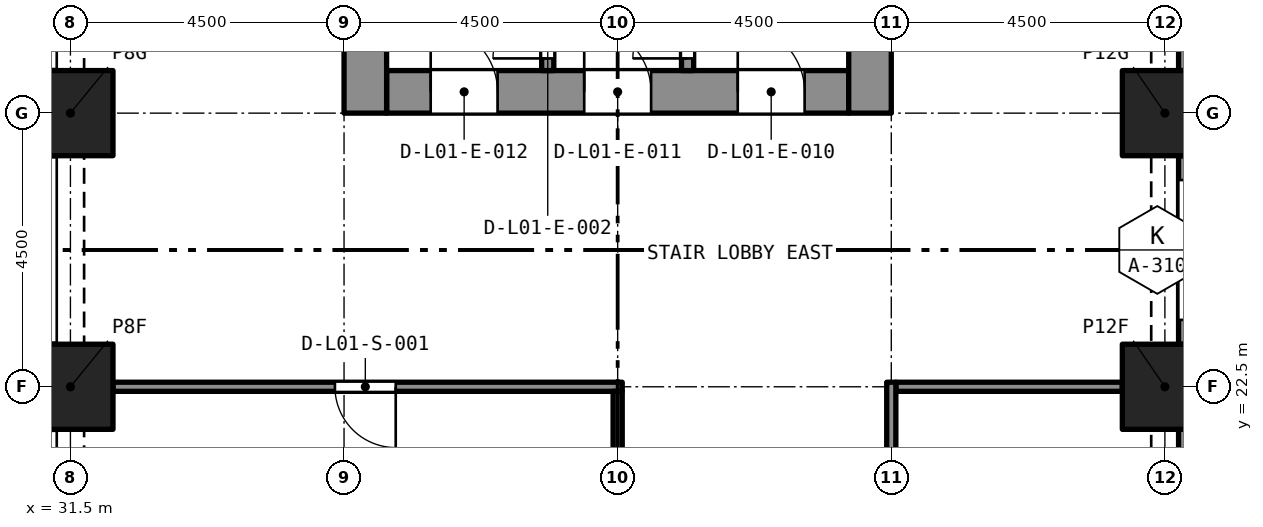
"""IFC4 building model, lengths in metres.
Left out: names, types, materials, properties, quantities, classifications, styles, units other than length and angle.
Written with IfcOpenShell. Run it as: python <this file> out.ifc"""

import sys

from ifc_helpers import new_model, si_unit, direction, frame, frame_2d, origin, origin_2d, place, context, subcontext, project, spatial, rectangle, extrude, element, fill, save


model = new_model("IFC4")
c1 = context("Model", 3, precision=1e-05, world=origin(), true_north=direction((0.0, 1.0)))
c2 = subcontext(c1, "Body", "Model", "MODEL_VIEW")
j1 = project(units=[si_unit("LENGTHUNIT", "METRE"), si_unit("PLANEANGLEUNIT", "RADIAN")], contexts=[c1])
p1 = place(None, origin())
s1 = spatial("IfcSite", under=j1, at=p1, CompositionType="ELEMENT")
p2 = place(p1, origin())
s2 = spatial("IfcBuilding", under=s1, at=p2, CompositionType="ELEMENT")
p3 = place(p2, frame((0.0, 0.0, 6.0)))
s3 = spatial("IfcBuildingStorey", under=s2, at=p3, CompositionType="ELEMENT", Elevation=6.0)
for number, where, z_axis, x_axis in (
    (1, (31.5, 22.5, 0.0), (0.0, 0.0, 1.0), (1.0, 0.0, 0.0)),
    (2, (49.5, 22.5, 0.0), (0.0, 0.0, 1.0), (1.0, 0.0, 0.0)),
    (3, (31.5, 27.0, 0.0), (0.0, 0.0, 1.0), (1.0, 0.0, 0.0)),
    (4, (49.5, 27.0, 0.0), (0.0, 0.0, 1.0), (1.0, 0.0, 0.0)),
):
    element("IfcColumn", number, at=place(p3, frame(where, z_axis=z_axis, x_axis=x_axis)), inside=s3, PredefinedType="COLUMN", context=c2, shape_type="SweptSolid", body=[
        extrude(rectangle(XDim=1.4, YDim=1.4, at=origin_2d()), origin(), (0.0, 0.0, 1.0), 5.0),
    ])
p4 = place(p3, frame((36.7, 27.35, 0.0), z_axis=(0.0, 0.0, 1.0), x_axis=(1.0, 0.0, 0.0)))
e5 = element("IfcWall", 5, at=p4, inside=s3, PredefinedType="SOLIDWALL", context=c2, shape_type="SweptSolid", body=[
    extrude(rectangle(XDim=7.6, YDim=0.7, at=frame_2d((3.8, 0.0))), origin(), (0.0, 0.0, 1.0), 5.0),
])
p5 = place(p4, frame((5.775, 0.0, 0.0)))
e6 = element("IfcOpeningElement", 6, at=p5, cuts=e5, PredefinedType="OPENING", context=c2, shape_type="SweptSolid", body=[
    extrude(rectangle(XDim=1.1, YDim=2.1, at=frame_2d((0.55, 1.05))), frame((0.0, 0.36, 0.0), z_axis=(0.0, -1.0, 0.0), x_axis=(1.0, 0.0, 0.0)), (0.0, 0.0, 1.0), 0.72),
])
p6 = place(p4, frame((3.25, 0.0, 0.0)))
e7 = element("IfcOpeningElement", 7, at=p6, cuts=e5, PredefinedType="OPENING", context=c2, shape_type="SweptSolid", body=[
    extrude(rectangle(XDim=1.1, YDim=2.1, at=frame_2d((0.55, 1.05))), frame((0.0, 0.36, 0.0), z_axis=(0.0, -1.0, 0.0), x_axis=(1.0, 0.0, 0.0)), (0.0, 0.0, 1.0), 0.72),
])
p7 = place(p4, frame((0.725, 0.0, 0.0)))
e8 = element("IfcOpeningElement", 8, at=p7, cuts=e5, PredefinedType="OPENING", context=c2, shape_type="SweptSolid", body=[
    extrude(rectangle(XDim=1.1, YDim=2.1, at=frame_2d((0.55, 1.05))), frame((0.0, 0.36, 0.0), z_axis=(0.0, -1.0, 0.0), x_axis=(1.0, 0.0, 0.0)), (0.0, 0.0, 1.0), 0.72),
])
p8 = place(p3, frame((36.35, 27.0, 0.0), z_axis=(0.0, 0.0, 1.0), x_axis=(0.0, 1.0, 0.0)))
e9 = element("IfcWall", 9, at=p8, inside=s3, PredefinedType="SOLIDWALL", context=c2, shape_type="SweptSolid", body=[
    extrude(rectangle(XDim=13.5, YDim=0.7, at=frame_2d((6.75, 0.0))), origin(), (0.0, 0.0, 1.0), 5.0),
])
p9 = place(p8, frame((8.95, 0.0, 0.0)))
e10 = element("IfcOpeningElement", 10, at=p9, cuts=e9, PredefinedType="OPENING", context=c2, shape_type="SweptSolid", body=[
    extrude(rectangle(XDim=1.2, YDim=2.1, at=frame_2d((0.6, 1.05))), frame((0.0, 0.36, 0.0), z_axis=(0.0, -1.0, 0.0), x_axis=(1.0, 0.0, 0.0)), (0.0, 0.0, 1.0), 0.72),
])
p10 = place(p3, frame((44.65, 27.0, 0.0), z_axis=(0.0, 0.0, 1.0), x_axis=(0.0, 1.0, 0.0)))
e11 = element("IfcWall", 11, at=p10, inside=s3, PredefinedType="SOLIDWALL", context=c2, shape_type="SweptSolid", body=[
    extrude(rectangle(XDim=13.5, YDim=0.7, at=frame_2d((6.75, 0.0))), origin(), (0.0, 0.0, 1.0), 5.0),
])
p11 = place(p10, frame((8.95, 0.0, 0.0)))
e12 = element("IfcOpeningElement", 12, at=p11, cuts=e11, PredefinedType="OPENING", context=c2, shape_type="SweptSolid", body=[
    extrude(rectangle(XDim=1.2, YDim=2.1, at=frame_2d((0.6, 1.05))), frame((0.0, 0.36, 0.0), z_axis=(0.0, -1.0, 0.0), x_axis=(1.0, 0.0, 0.0)), (0.0, 0.0, 1.0), 0.72),
])
p12 = place(p3, frame((49.875, 21.8, 0.0), z_axis=(0.0, 0.0, 1.0), x_axis=(0.0, -1.0, 0.0)))
e13 = element("IfcWall", 13, at=p12, inside=s3, PredefinedType="SOLIDWALL", context=c2, shape_type="SweptSolid", body=[
    extrude(rectangle(XDim=3.1, YDim=0.3, at=frame_2d((1.55, 0.0))), origin(), (0.0, 0.0, 1.0), 5.0),
])
p13 = place(p12, frame((0.4, 0.0, 0.45)))
e14 = element("IfcOpeningElement", 14, at=p13, cuts=e13, PredefinedType="OPENING", context=c2, shape_type="SweptSolid", body=[
    extrude(rectangle(XDim=2.3, YDim=3.3, at=frame_2d((1.15, 1.65))), frame((0.0, 0.16, 0.0), z_axis=(0.0, -1.0, 0.0), x_axis=(1.0, 0.0, 0.0)), (0.0, 0.0, 1.0), 0.32),
])
p14 = place(p3, frame((49.875, 26.3, 0.0), z_axis=(0.0, 0.0, 1.0), x_axis=(0.0, -1.0, 0.0)))
e15 = element("IfcWall", 15, at=p14, inside=s3, PredefinedType="SOLIDWALL", context=c2, shape_type="SweptSolid", body=[
    extrude(rectangle(XDim=3.1, YDim=0.3, at=frame_2d((1.55, 0.0))), origin(), (0.0, 0.0, 1.0), 5.0),
])
p15 = place(p14, frame((0.4, 0.0, 0.45)))
e16 = element("IfcOpeningElement", 16, at=p15, cuts=e15, PredefinedType="OPENING", context=c2, shape_type="SweptSolid", body=[
    extrude(rectangle(XDim=2.3, YDim=3.3, at=frame_2d((1.15, 1.65))), frame((0.0, 0.16, 0.0), z_axis=(0.0, -1.0, 0.0), x_axis=(1.0, 0.0, 0.0)), (0.0, 0.0, 1.0), 0.32),
])
p16 = place(p3, frame((49.875, 30.8, 0.0), z_axis=(0.0, 0.0, 1.0), x_axis=(0.0, -1.0, 0.0)))
e17 = element("IfcWall", 17, at=p16, inside=s3, PredefinedType="SOLIDWALL", context=c2, shape_type="SweptSolid", body=[
    extrude(rectangle(XDim=3.1, YDim=0.3, at=frame_2d((1.55, 0.0))), origin(), (0.0, 0.0, 1.0), 5.0),
])
p17 = place(p16, frame((0.4, 0.0, 0.45)))
e18 = element("IfcOpeningElement", 18, at=p17, cuts=e17, PredefinedType="OPENING", context=c2, shape_type="SweptSolid", body=[
    extrude(rectangle(XDim=2.3, YDim=3.3, at=frame_2d((1.15, 1.65))), frame((0.0, 0.16, 0.0), z_axis=(0.0, -1.0, 0.0), x_axis=(1.0, 0.0, 0.0)), (0.0, 0.0, 1.0), 0.32),
])
p18 = place(p3, frame((41.65, 27.7, 0.0), z_axis=(0.0, 0.0, 1.0), x_axis=(0.0, 1.0, 0.0)))
e19 = element("IfcWall", 19, at=p18, inside=s3, PredefinedType="SOLIDWALL", context=c2, shape_type="SweptSolid", body=[
    extrude(rectangle(XDim=5.4, YDim=0.2, at=frame_2d((2.7, 0.0))), origin(), (0.0, 0.0, 1.0), 4.65),
])
p19 = place(p18, frame((0.2, 0.0, 0.0)))
e20 = element("IfcOpeningElement", 20, at=p19, cuts=e19, PredefinedType="OPENING", context=c2, shape_type="SweptSolid", body=[
    extrude(rectangle(XDim=0.9, YDim=2.1, at=frame_2d((0.45, 1.05))), frame((0.0, 0.11, 0.0), z_axis=(0.0, -1.0, 0.0), x_axis=(1.0, 0.0, 0.0)), (0.0, 0.0, 1.0), 0.22),
])
p20 = place(p3, frame((39.35, 27.7, 0.0), z_axis=(0.0, 0.0, 1.0), x_axis=(0.0, 1.0, 0.0)))
e21 = element("IfcWall", 21, at=p20, inside=s3, PredefinedType="SOLIDWALL", context=c2, shape_type="SweptSolid", body=[
    extrude(rectangle(XDim=5.4, YDim=0.2, at=frame_2d((2.7, 0.0))), origin(), (0.0, 0.0, 1.0), 4.65),
])
p21 = place(p20, frame((0.2, 0.0, 0.0)))
e22 = element("IfcOpeningElement", 22, at=p21, cuts=e21, PredefinedType="OPENING", context=c2, shape_type="SweptSolid", body=[
    extrude(rectangle(XDim=0.9, YDim=2.1, at=frame_2d((0.45, 1.05))), frame((0.0, 0.11, 0.0), z_axis=(0.0, -1.0, 0.0), x_axis=(1.0, 0.0, 0.0)), (0.0, 0.0, 1.0), 0.22),
])
p22 = place(p3, frame((40.575, 22.5, 0.0), z_axis=(0.0, 0.0, 1.0), x_axis=(-1.0, 0.0, 0.0)))
e23 = element("IfcWall", 23, at=p22, inside=s3, PredefinedType="PARTITIONING", context=c2, shape_type="SweptSolid", body=[
    extrude(rectangle(XDim=8.375, YDim=0.15, at=frame_2d((4.188, 0.0))), origin(), (0.0, 0.0, 1.0), 4.65),
])
p23 = place(p22, frame((3.725, 0.0, 0.0)))
e24 = element("IfcOpeningElement", 24, at=p23, cuts=e23, PredefinedType="OPENING", context=c2, shape_type="SweptSolid", body=[
    extrude(rectangle(XDim=1.0, YDim=2.1, at=frame_2d((0.5, 1.05))), frame((0.0, 0.085, 0.0), z_axis=(0.0, -1.0, 0.0), x_axis=(1.0, 0.0, 0.0)), (0.0, 0.0, 1.0), 0.17),
])
p24 = place(p3, frame((45.075, 22.5, 0.0), z_axis=(0.0, 0.0, 1.0), x_axis=(1.0, 0.0, 0.0)))
e25 = element("IfcWall", 25, at=p24, inside=s3, PredefinedType="PARTITIONING", context=c2, shape_type="SweptSolid", body=[
    extrude(rectangle(XDim=3.725, YDim=0.15, at=frame_2d((1.863, 0.0))), origin(), (0.0, 0.0, 1.0), 4.65),
])
p25 = place(p3, frame((40.5, 9.0, 0.0), z_axis=(0.0, 0.0, 1.0), x_axis=(0.0, 1.0, 0.0)))
e26 = element("IfcWall", 26, at=p25, inside=s3, PredefinedType="PARTITIONING", context=c2, shape_type="SweptSolid", body=[
    extrude(rectangle(XDim=13.425, YDim=0.15, at=frame_2d((6.712, 0.0))), origin(), (0.0, 0.0, 1.0), 4.65),
])
p26 = place(p25, frame((6.15, 0.0, 0.0)))
e27 = element("IfcOpeningElement", 27, at=p26, cuts=e26, PredefinedType="OPENING", context=c2, shape_type="SweptSolid", body=[
    extrude(rectangle(XDim=1.2, YDim=2.1, at=frame_2d((0.6, 1.05))), frame((0.0, 0.085, 0.0), z_axis=(0.0, -1.0, 0.0), x_axis=(1.0, 0.0, 0.0)), (0.0, 0.0, 1.0), 0.17),
])
p27 = place(p3, frame((45.0, 22.575, 0.0), z_axis=(0.0, 0.0, 1.0), x_axis=(0.0, -1.0, 0.0)))
e28 = element("IfcWall", 28, at=p27, inside=s3, PredefinedType="PARTITIONING", context=c2, shape_type="SweptSolid", body=[
    extrude(rectangle(XDim=9.075, YDim=0.15, at=frame_2d((4.538, 0.0))), origin(), (0.0, 0.0, 1.0), 4.65),
])
p28 = place(p27, frame((4.175, 0.0, 0.0)))
e29 = element("IfcOpeningElement", 29, at=p28, cuts=e28, PredefinedType="OPENING", context=c2, shape_type="SweptSolid", body=[
    extrude(rectangle(XDim=0.8, YDim=2.1, at=frame_2d((0.4, 1.05))), frame((0.0, 0.085, 0.0), z_axis=(0.0, -1.0, 0.0), x_axis=(1.0, 0.0, 0.0)), (0.0, 0.0, 1.0), 0.17),
])
p29 = place(p19, origin())
e30 = element("IfcDoor", 30, at=p29, inside=s3, OperationType="SINGLE_SWING_LEFT", PredefinedType="DOOR", context=c2, shape_type="SweptSolid", body=[
    extrude(rectangle(XDim=0.9, YDim=2.1, at=frame_2d((0.45, 1.05))), frame((0.0, 0.025, 0.0), z_axis=(0.0, -1.0, 0.0), x_axis=(1.0, 0.0, 0.0)), (0.0, 0.0, 1.0), 0.05),
])
fill(e20, e30)
p30 = place(p21, origin())
e31 = element("IfcDoor", 31, at=p30, inside=s3, OperationType="SINGLE_SWING_LEFT", PredefinedType="DOOR", context=c2, shape_type="SweptSolid", body=[
    extrude(rectangle(XDim=0.9, YDim=2.1, at=frame_2d((0.45, 1.05))), frame((0.0, 0.025, 0.0), z_axis=(0.0, -1.0, 0.0), x_axis=(1.0, 0.0, 0.0)), (0.0, 0.0, 1.0), 0.05),
])
fill(e22, e31)
p31 = place(p5, origin())
e32 = element("IfcDoor", 32, at=p31, inside=s3, OperationType="SINGLE_SWING_LEFT", PredefinedType="DOOR", context=c2, shape_type="SweptSolid", body=[
    extrude(rectangle(XDim=1.1, YDim=2.1, at=frame_2d((0.55, 1.05))), frame((0.0, 0.025, 0.0), z_axis=(0.0, -1.0, 0.0), x_axis=(1.0, 0.0, 0.0)), (0.0, 0.0, 1.0), 0.05),
])
fill(e6, e32)
p32 = place(p6, origin())
e33 = element("IfcDoor", 33, at=p32, inside=s3, OperationType="SINGLE_SWING_LEFT", PredefinedType="DOOR", context=c2, shape_type="SweptSolid", body=[
    extrude(rectangle(XDim=1.1, YDim=2.1, at=frame_2d((0.55, 1.05))), frame((0.0, 0.025, 0.0), z_axis=(0.0, -1.0, 0.0), x_axis=(1.0, 0.0, 0.0)), (0.0, 0.0, 1.0), 0.05),
])
fill(e7, e33)
p33 = place(p7, origin())
e34 = element("IfcDoor", 34, at=p33, inside=s3, OperationType="SINGLE_SWING_LEFT", PredefinedType="DOOR", context=c2, shape_type="SweptSolid", body=[
    extrude(rectangle(XDim=1.1, YDim=2.1, at=frame_2d((0.55, 1.05))), frame((0.0, 0.025, 0.0), z_axis=(0.0, -1.0, 0.0), x_axis=(1.0, 0.0, 0.0)), (0.0, 0.0, 1.0), 0.05),
])
fill(e8, e34)
p34 = place(p23, origin())
e35 = element("IfcDoor", 35, at=p34, inside=s3, OperationType="SINGLE_SWING_RIGHT", PredefinedType="DOOR", context=c2, shape_type="SweptSolid", body=[
    extrude(rectangle(XDim=1.0, YDim=2.1, at=frame_2d((0.5, 1.05))), frame((0.0, 0.025, 0.0), z_axis=(0.0, -1.0, 0.0), x_axis=(1.0, 0.0, 0.0)), (0.0, 0.0, 1.0), 0.05),
])
fill(e24, e35)
save(model, sys.argv[1])
